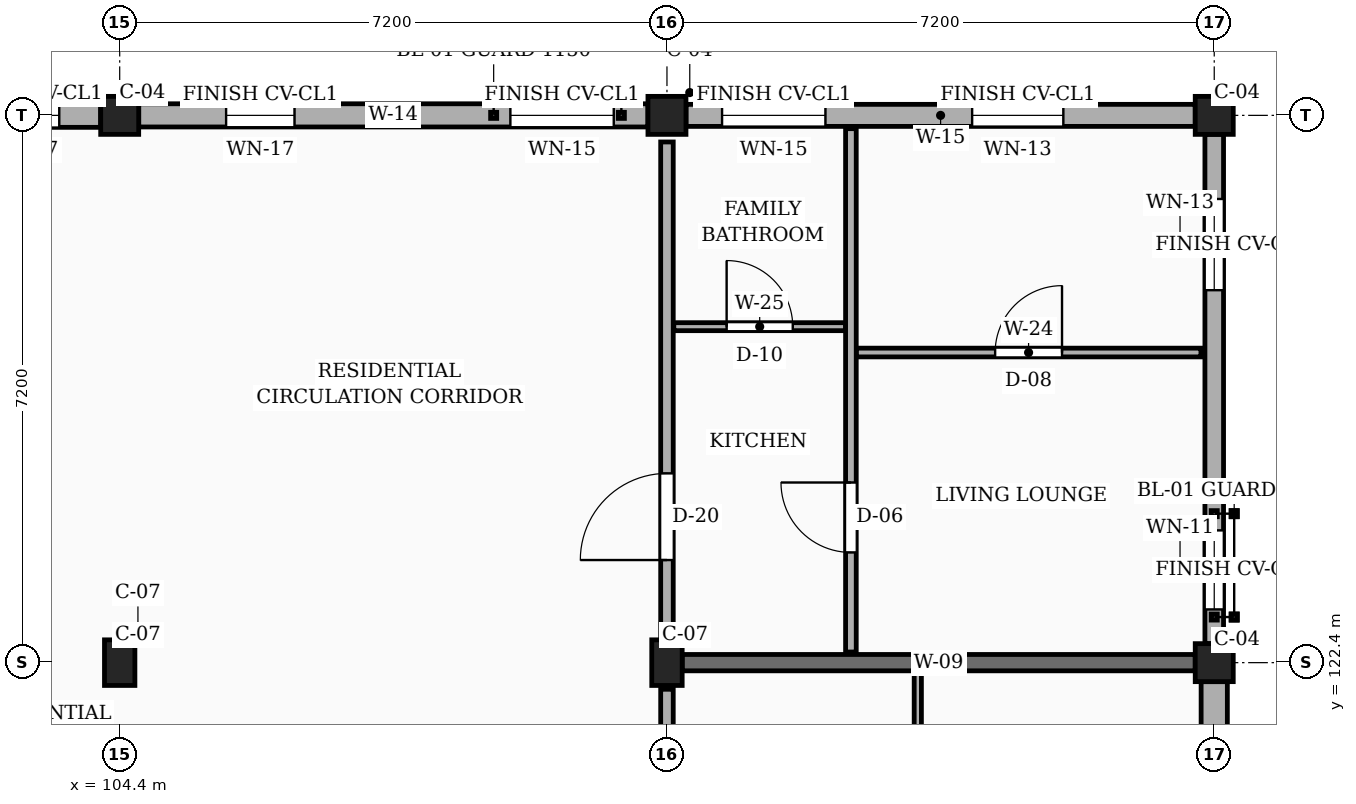
"""IFC4 building model, lengths in metres.
Left out: names, types, materials, properties, quantities, classifications, styles, units other than length and angle.
Written with IfcOpenShell. Run it as: python <this file> out.ifc"""

import sys

from ifc_helpers import new_model, si_unit, direction, frame, frame_2d, origin, origin_2d, place, context, subcontext, project, spatial, rectangle, extrude, element, fill, save


model = new_model("IFC4")
c1 = context("Model", 3, precision=1e-05, world=origin(), true_north=direction((0.0, 1.0)))
c2 = subcontext(c1, "Body", "Model", "MODEL_VIEW")
j1 = project(units=[si_unit("LENGTHUNIT", "METRE"), si_unit("PLANEANGLEUNIT", "RADIAN")], contexts=[c1])
p1 = place(None, origin())
s1 = spatial("IfcSite", under=j1, at=p1, CompositionType="ELEMENT")
p2 = place(p1, origin())
s2 = spatial("IfcBuilding", under=s1, at=p2, CompositionType="ELEMENT")
p3 = place(p2, frame((0.0, 0.0, 26.55)))
s3 = spatial("IfcBuildingStorey", under=s2, at=p3, CompositionType="ELEMENT", Elevation=26.55)
p4 = place(p3, frame((104.4, 122.4, 0.0), z_axis=(0.0, 0.0, 1.0), x_axis=(1.0, 0.0, 0.0)))
e1 = element("IfcColumn", 1, at=p4, inside=s3, PredefinedType="COLUMN", context=c2, shape_type="SweptSolid", body=[
    extrude(rectangle(XDim=0.4, YDim=0.6, at=origin_2d()), origin(), (0.0, 0.0, 1.0), 3.15),
])
p5 = place(p3, frame((104.4, 129.6, 0.0), z_axis=(0.0, 0.0, 1.0), x_axis=(1.0, 0.0, 0.0)))
e2 = element("IfcColumn", 2, at=p5, inside=s3, PredefinedType="COLUMN", context=c2, shape_type="SweptSolid", body=[
    extrude(rectangle(XDim=0.5, YDim=0.5, at=origin_2d()), origin(), (0.0, 0.0, 1.0), 3.15),
])
p6 = place(p3, frame((111.6, 122.4, 0.0), z_axis=(0.0, 0.0, 1.0), x_axis=(1.0, 0.0, 0.0)))
e3 = element("IfcColumn", 3, at=p6, inside=s3, PredefinedType="COLUMN", context=c2, shape_type="SweptSolid", body=[
    extrude(rectangle(XDim=0.4, YDim=0.6, at=origin_2d()), origin(), (0.0, 0.0, 1.0), 3.15),
])
for number, where, z_axis, x_axis in (
    (4, (111.6, 129.6, 0.0), (0.0, 0.0, 1.0), (1.0, 0.0, 0.0)),
    (5, (118.8, 122.4, 0.0), (0.0, 0.0, 1.0), (1.0, 0.0, 0.0)),
    (6, (118.8, 129.6, 0.0), (0.0, 0.0, 1.0), (1.0, 0.0, 0.0)),
):
    element("IfcColumn", number, at=place(p3, frame(where, z_axis=z_axis, x_axis=x_axis)), inside=s3, PredefinedType="COLUMN", context=c2, shape_type="SweptSolid", body=[
        extrude(rectangle(XDim=0.5, YDim=0.5, at=origin_2d()), origin(), (0.0, 0.0, 1.0), 3.15),
    ])
p7 = place(p3, frame((111.8, 122.4, 0.0), z_axis=(0.0, 0.0, 1.0), x_axis=(1.0, 0.0, 0.0)))
e7 = element("IfcWall", 7, at=p7, inside=s3, PredefinedType="SOLIDWALL", context=c2, shape_type="SweptSolid", body=[
    extrude(rectangle(XDim=6.75, YDim=0.215, at=frame_2d((3.375, 0.0))), origin(), (0.0, 0.0, 1.0), 2.19),
])
p8 = place(p3, frame((118.8, 115.45, 0.0), z_axis=(0.0, 0.0, 1.0), x_axis=(0.0, 1.0, 0.0)))
e8 = element("IfcWall", 8, at=p8, inside=s3, PredefinedType="SOLIDWALL", context=c2, shape_type="SweptSolid", body=[
    extrude(rectangle(XDim=6.7, YDim=0.345, at=frame_2d((3.35, 0.0))), origin(), (0.0, 0.0, 1.0), 2.46),
])
p9 = place(p8, frame((0.45, 0.0, 0.78)))
e9 = element("IfcOpeningElement", 9, at=p9, cuts=e8, PredefinedType="OPENING", context=c2, shape_type="SweptSolid", body=[
    extrude(rectangle(XDim=0.88, YDim=1.26, at=frame_2d((0.44, 0.63))), frame((0.0, 0.183, 0.0), z_axis=(0.0, -1.0, 0.0), x_axis=(1.0, 0.0, 0.0)), (0.0, 0.0, 1.0), 0.365),
])
p10 = place(p8, frame((4.65, 0.0, 0.78)))
e10 = element("IfcOpeningElement", 10, at=p10, cuts=e8, PredefinedType="OPENING", context=c2, shape_type="SweptSolid", body=[
    extrude(rectangle(XDim=1.04, YDim=1.26, at=frame_2d((0.52, 0.63))), frame((0.0, 0.183, 0.0), z_axis=(0.0, -1.0, 0.0), x_axis=(1.0, 0.0, 0.0)), (0.0, 0.0, 1.0), 0.365),
])
p11 = place(p3, frame((118.8, 122.65, 0.0), z_axis=(0.0, 0.0, 1.0), x_axis=(0.0, 1.0, 0.0)))
e11 = element("IfcWall", 11, at=p11, inside=s3, PredefinedType="SOLIDWALL", context=c2, shape_type="SweptSolid", body=[
    extrude(rectangle(XDim=6.7, YDim=0.245, at=frame_2d((3.35, 0.0))), origin(), (0.0, 0.0, 1.0), 2.46),
])
p12 = place(p11, frame((0.45, 0.0, 0.78)))
e12 = element("IfcOpeningElement", 12, at=p12, cuts=e11, PredefinedType="OPENING", context=c2, shape_type="SweptSolid", body=[
    extrude(rectangle(XDim=1.04, YDim=1.26, at=frame_2d((0.52, 0.63))), frame((0.0, 0.133, 0.0), z_axis=(0.0, -1.0, 0.0), x_axis=(1.0, 0.0, 0.0)), (0.0, 0.0, 1.0), 0.265),
])
p13 = place(p11, frame((4.65, 0.0, 0.78)))
e13 = element("IfcOpeningElement", 13, at=p13, cuts=e11, PredefinedType="OPENING", context=c2, shape_type="SweptSolid", body=[
    extrude(rectangle(XDim=1.2, YDim=1.26, at=frame_2d((0.6, 0.63))), frame((0.0, 0.133, 0.0), z_axis=(0.0, -1.0, 0.0), x_axis=(1.0, 0.0, 0.0)), (0.0, 0.0, 1.0), 0.265),
])
p14 = place(p3, frame((118.55, 129.6, 0.0), z_axis=(0.0, 0.0, 1.0), x_axis=(-1.0, 0.0, 0.0)))
e14 = element("IfcWall", 14, at=p14, inside=s3, PredefinedType="SOLIDWALL", context=c2, shape_type="SweptSolid", body=[
    extrude(rectangle(XDim=6.7, YDim=0.29, at=frame_2d((3.35, 0.0))), origin(), (0.0, 0.0, 1.0), 2.46),
])
p15 = place(p14, frame((1.735, 0.0, 0.78)))
e15 = element("IfcOpeningElement", 15, at=p15, cuts=e14, PredefinedType="OPENING", context=c2, shape_type="SweptSolid", body=[
    extrude(rectangle(XDim=1.2, YDim=1.26, at=frame_2d((0.6, 0.63))), frame((0.0, 0.155, 0.0), z_axis=(0.0, -1.0, 0.0), x_axis=(1.0, 0.0, 0.0)), (0.0, 0.0, 1.0), 0.31),
])
p16 = place(p14, frame((4.865, 0.0, 0.78)))
e16 = element("IfcOpeningElement", 16, at=p16, cuts=e14, PredefinedType="OPENING", context=c2, shape_type="SweptSolid", body=[
    extrude(rectangle(XDim=1.36, YDim=1.26, at=frame_2d((0.68, 0.63))), frame((0.0, 0.155, 0.0), z_axis=(0.0, -1.0, 0.0), x_axis=(1.0, 0.0, 0.0)), (0.0, 0.0, 1.0), 0.31),
])
p17 = place(p3, frame((111.35, 129.6, 0.0), z_axis=(0.0, 0.0, 1.0), x_axis=(-1.0, 0.0, 0.0)))
e17 = element("IfcWall", 17, at=p17, inside=s3, PredefinedType="SOLIDWALL", context=c2, shape_type="SweptSolid", body=[
    extrude(rectangle(XDim=6.7, YDim=0.305, at=frame_2d((3.35, 0.0))), origin(), (0.0, 0.0, 1.0), 2.46),
])
p18 = place(p17, frame((0.45, 0.0, 0.78)))
e18 = element("IfcOpeningElement", 18, at=p18, cuts=e17, PredefinedType="OPENING", context=c2, shape_type="SweptSolid", body=[
    extrude(rectangle(XDim=1.36, YDim=1.26, at=frame_2d((0.68, 0.63))), frame((0.0, 0.163, 0.0), z_axis=(0.0, -1.0, 0.0), x_axis=(1.0, 0.0, 0.0)), (0.0, 0.0, 1.0), 0.325),
])
p19 = place(p17, frame((4.65, 0.0, 0.78)))
e19 = element("IfcOpeningElement", 19, at=p19, cuts=e17, PredefinedType="OPENING", context=c2, shape_type="SweptSolid", body=[
    extrude(rectangle(XDim=0.9, YDim=1.36, at=frame_2d((0.45, 0.68))), frame((0.0, 0.163, 0.0), z_axis=(0.0, -1.0, 0.0), x_axis=(1.0, 0.0, 0.0)), (0.0, 0.0, 1.0), 0.325),
])
p20 = place(p3, frame((104.15, 129.6, 0.0), z_axis=(0.0, 0.0, 1.0), x_axis=(-1.0, 0.0, 0.0)))
e20 = element("IfcWall", 20, at=p20, inside=s3, PredefinedType="SOLIDWALL", context=c2, shape_type="SweptSolid", body=[
    extrude(rectangle(XDim=6.7, YDim=0.315, at=frame_2d((3.35, 0.0))), origin(), (0.0, 0.0, 1.0), 2.46),
])
p21 = place(p20, frame((0.545, 0.0, 0.78)))
e21 = element("IfcOpeningElement", 21, at=p21, cuts=e20, PredefinedType="OPENING", context=c2, shape_type="SweptSolid", body=[
    extrude(rectangle(XDim=0.9, YDim=1.36, at=frame_2d((0.45, 0.68))), frame((0.0, 0.167, 0.0), z_axis=(0.0, -1.0, 0.0), x_axis=(1.0, 0.0, 0.0)), (0.0, 0.0, 1.0), 0.335),
])
p22 = place(p20, frame((2.33, 0.0, 0.78)))
e22 = element("IfcOpeningElement", 22, at=p22, cuts=e20, PredefinedType="OPENING", context=c2, shape_type="SweptSolid", body=[
    extrude(rectangle(XDim=1.06, YDim=1.36, at=frame_2d((0.53, 0.68))), frame((0.0, 0.167, 0.0), z_axis=(0.0, -1.0, 0.0), x_axis=(1.0, 0.0, 0.0)), (0.0, 0.0, 1.0), 0.335),
])
p23 = place(p20, frame((4.605, 0.0, 0.78)))
e23 = element("IfcOpeningElement", 23, at=p23, cuts=e20, PredefinedType="OPENING", context=c2, shape_type="SweptSolid", body=[
    extrude(rectangle(XDim=1.22, YDim=1.36, at=frame_2d((0.61, 0.68))), frame((0.0, 0.167, 0.0), z_axis=(0.0, -1.0, 0.0), x_axis=(1.0, 0.0, 0.0)), (0.0, 0.0, 1.0), 0.335),
])
p24 = place(p3, frame((111.6, 115.55, 0.0), z_axis=(0.0, 0.0, 1.0), x_axis=(0.0, 1.0, 0.0)))
e24 = element("IfcWall", 24, at=p24, inside=s3, PredefinedType="PARTITIONING", context=c2, shape_type="SweptSolid", body=[
    extrude(rectangle(XDim=6.5, YDim=0.165, at=frame_2d((3.25, 0.0))), origin(), (0.0, 0.0, 1.0), 2.325),
])
p25 = place(p24, frame((1.1, 0.0, 0.0)))
e25 = element("IfcOpeningElement", 25, at=p25, cuts=e24, PredefinedType="OPENING", context=c2, shape_type="SweptSolid", body=[
    extrude(rectangle(XDim=0.94, YDim=2.12, at=frame_2d((0.47, 1.06))), frame((0.0, 0.093, 0.0), z_axis=(0.0, -1.0, 0.0), x_axis=(1.0, 0.0, 0.0)), (0.0, 0.0, 1.0), 0.185),
])
p26 = place(p3, frame((111.6, 122.75, 0.0), z_axis=(0.0, 0.0, 1.0), x_axis=(0.0, 1.0, 0.0)))
e26 = element("IfcWall", 26, at=p26, inside=s3, PredefinedType="PARTITIONING", context=c2, shape_type="SweptSolid", body=[
    extrude(rectangle(XDim=6.5, YDim=0.165, at=frame_2d((3.25, 0.0))), origin(), (0.0, 0.0, 1.0), 2.325),
])
p27 = place(p26, frame((1.0, 0.0, 0.0)))
e27 = element("IfcOpeningElement", 27, at=p27, cuts=e26, PredefinedType="OPENING", context=c2, shape_type="SweptSolid", body=[
    extrude(rectangle(XDim=1.14, YDim=2.18, at=frame_2d((0.57, 1.09))), frame((0.0, 0.093, 0.0), z_axis=(0.0, -1.0, 0.0), x_axis=(1.0, 0.0, 0.0)), (0.0, 0.0, 1.0), 0.185),
])
p28 = place(p3, frame((114.9, 119.07, 0.0), z_axis=(0.0, 0.0, 1.0), x_axis=(0.0, 1.0, 0.0)))
e28 = element("IfcWall", 28, at=p28, inside=s3, PredefinedType="PARTITIONING", context=c2, shape_type="SweptSolid", body=[
    extrude(rectangle(XDim=3.19, YDim=0.095, at=frame_2d((1.595, 0.0))), origin(), (0.0, 0.0, 1.0), 2.325),
])
p29 = place(p3, frame((114.09, 126.48, 0.0), z_axis=(0.0, 0.0, 1.0), x_axis=(1.0, 0.0, 0.0)))
e29 = element("IfcWall", 29, at=p29, inside=s3, PredefinedType="PARTITIONING", context=c2, shape_type="SweptSolid", body=[
    extrude(rectangle(XDim=4.535, YDim=0.115, at=frame_2d((2.268, 0.0))), origin(), (0.0, 0.0, 1.0), 2.325),
])
p30 = place(p29, frame((1.827, 0.0, 0.0)))
e30 = element("IfcOpeningElement", 30, at=p30, cuts=e29, PredefinedType="OPENING", context=c2, shape_type="SweptSolid", body=[
    extrude(rectangle(XDim=0.88, YDim=2.08, at=frame_2d((0.44, 1.04))), frame((0.0, 0.067, 0.0), z_axis=(0.0, -1.0, 0.0), x_axis=(1.0, 0.0, 0.0)), (0.0, 0.0, 1.0), 0.135),
])
p31 = place(p3, frame((111.69, 126.82, 0.0), z_axis=(0.0, 0.0, 1.0), x_axis=(1.0, 0.0, 0.0)))
e31 = element("IfcWall", 31, at=p31, inside=s3, PredefinedType="PARTITIONING", context=c2, shape_type="SweptSolid", body=[
    extrude(rectangle(XDim=2.26, YDim=0.105, at=frame_2d((1.13, 0.0))), origin(), (0.0, 0.0, 1.0), 2.325),
])
p32 = place(p31, frame((0.695, 0.0, 0.0)))
e32 = element("IfcOpeningElement", 32, at=p32, cuts=e31, PredefinedType="OPENING", context=c2, shape_type="SweptSolid", body=[
    extrude(rectangle(XDim=0.87, YDim=2.05, at=frame_2d((0.435, 1.025))), frame((0.0, 0.062, 0.0), z_axis=(0.0, -1.0, 0.0), x_axis=(1.0, 0.0, 0.0)), (0.0, 0.0, 1.0), 0.125),
])
p33 = place(p3, frame((114.02, 122.54, 0.0), z_axis=(0.0, 0.0, 1.0), x_axis=(0.0, 1.0, 0.0)))
e33 = element("IfcWall", 33, at=p33, inside=s3, PredefinedType="PARTITIONING", context=c2, shape_type="SweptSolid", body=[
    extrude(rectangle(XDim=6.885, YDim=0.14, at=frame_2d((3.442, 0.0))), origin(), (0.0, 0.0, 1.0), 2.325),
])
p34 = place(p33, frame((1.31, 0.0, 0.0)))
e34 = element("IfcOpeningElement", 34, at=p34, cuts=e33, PredefinedType="OPENING", context=c2, shape_type="SweptSolid", body=[
    extrude(rectangle(XDim=0.92, YDim=2.1, at=frame_2d((0.46, 1.05))), frame((0.0, 0.08, 0.0), z_axis=(0.0, -1.0, 0.0), x_axis=(1.0, 0.0, 0.0)), (0.0, 0.0, 1.0), 0.16),
])
p35 = place(p12, origin())
e35 = element("IfcWindow", 35, at=p35, inside=s3, PartitioningType="SINGLE_PANEL", PredefinedType="WINDOW", context=c2, shape_type="SweptSolid", body=[
    extrude(rectangle(XDim=1.04, YDim=1.26, at=frame_2d((0.52, 0.63))), frame((0.0, 0.03, 0.0), z_axis=(0.0, -1.0, 0.0), x_axis=(1.0, 0.0, 0.0)), (0.0, 0.0, 1.0), 0.06),
])
fill(e12, e35)
p36 = place(p13, origin())
e36 = element("IfcWindow", 36, at=p36, inside=s3, PartitioningType="SINGLE_PANEL", PredefinedType="WINDOW", context=c2, shape_type="SweptSolid", body=[
    extrude(rectangle(XDim=1.2, YDim=1.26, at=frame_2d((0.6, 0.63))), frame((0.0, 0.03, 0.0), z_axis=(0.0, -1.0, 0.0), x_axis=(1.0, 0.0, 0.0)), (0.0, 0.0, 1.0), 0.06),
])
fill(e13, e36)
p37 = place(p15, origin())
e37 = element("IfcWindow", 37, at=p37, inside=s3, PartitioningType="SINGLE_PANEL", PredefinedType="WINDOW", context=c2, shape_type="SweptSolid", body=[
    extrude(rectangle(XDim=1.2, YDim=1.26, at=frame_2d((0.6, 0.63))), frame((0.0, 0.03, 0.0), z_axis=(0.0, -1.0, 0.0), x_axis=(1.0, 0.0, 0.0)), (0.0, 0.0, 1.0), 0.06),
])
fill(e15, e37)
p38 = place(p16, origin())
e38 = element("IfcWindow", 38, at=p38, inside=s3, PartitioningType="SINGLE_PANEL", PredefinedType="WINDOW", context=c2, shape_type="SweptSolid", body=[
    extrude(rectangle(XDim=1.36, YDim=1.26, at=frame_2d((0.68, 0.63))), frame((0.0, 0.03, 0.0), z_axis=(0.0, -1.0, 0.0), x_axis=(1.0, 0.0, 0.0)), (0.0, 0.0, 1.0), 0.06),
])
fill(e16, e38)
p39 = place(p18, origin())
e39 = element("IfcWindow", 39, at=p39, inside=s3, PartitioningType="SINGLE_PANEL", PredefinedType="WINDOW", context=c2, shape_type="SweptSolid", body=[
    extrude(rectangle(XDim=1.36, YDim=1.26, at=frame_2d((0.68, 0.63))), frame((0.0, 0.03, 0.0), z_axis=(0.0, -1.0, 0.0), x_axis=(1.0, 0.0, 0.0)), (0.0, 0.0, 1.0), 0.06),
])
fill(e18, e39)
p40 = place(p19, origin())
e40 = element("IfcWindow", 40, at=p40, inside=s3, PartitioningType="SINGLE_PANEL", PredefinedType="WINDOW", context=c2, shape_type="SweptSolid", body=[
    extrude(rectangle(XDim=0.9, YDim=1.36, at=frame_2d((0.45, 0.68))), frame((0.0, 0.03, 0.0), z_axis=(0.0, -1.0, 0.0), x_axis=(1.0, 0.0, 0.0)), (0.0, 0.0, 1.0), 0.06),
])
fill(e19, e40)
p41 = place(p21, origin())
e41 = element("IfcWindow", 41, at=p41, inside=s3, PartitioningType="SINGLE_PANEL", PredefinedType="WINDOW", context=c2, shape_type="SweptSolid", body=[
    extrude(rectangle(XDim=0.9, YDim=1.36, at=frame_2d((0.45, 0.68))), frame((0.0, 0.03, 0.0), z_axis=(0.0, -1.0, 0.0), x_axis=(1.0, 0.0, 0.0)), (0.0, 0.0, 1.0), 0.06),
])
fill(e21, e41)
p42 = place(p27, origin())
e42 = element("IfcDoor", 42, at=p42, inside=s3, OperationType="SINGLE_SWING_LEFT", PredefinedType="DOOR", context=c2, shape_type="SweptSolid", body=[
    extrude(rectangle(XDim=1.14, YDim=2.18, at=frame_2d((0.57, 1.09))), frame((0.0, 0.025, 0.0), z_axis=(0.0, -1.0, 0.0), x_axis=(1.0, 0.0, 0.0)), (0.0, 0.0, 1.0), 0.05),
])
fill(e27, e42)
p43 = place(p30, origin())
e43 = element("IfcDoor", 43, at=p43, inside=s3, OperationType="SINGLE_SWING_RIGHT", PredefinedType="DOOR", context=c2, shape_type="SweptSolid", body=[
    extrude(rectangle(XDim=0.88, YDim=2.08, at=frame_2d((0.44, 1.04))), frame((0.0, 0.025, 0.0), z_axis=(0.0, -1.0, 0.0), x_axis=(1.0, 0.0, 0.0)), (0.0, 0.0, 1.0), 0.05),
])
fill(e30, e43)
p44 = place(p32, origin())
e44 = element("IfcDoor", 44, at=p44, inside=s3, OperationType="SINGLE_SWING_LEFT", PredefinedType="DOOR", context=c2, shape_type="SweptSolid", body=[
    extrude(rectangle(XDim=0.87, YDim=2.05, at=frame_2d((0.435, 1.025))), frame((0.0, 0.025, 0.0), z_axis=(0.0, -1.0, 0.0), x_axis=(1.0, 0.0, 0.0)), (0.0, 0.0, 1.0), 0.05),
])
fill(e32, e44)
p45 = place(p34, origin())
e45 = element("IfcDoor", 45, at=p45, inside=s3, OperationType="SINGLE_SWING_RIGHT", PredefinedType="DOOR", context=c2, shape_type="SweptSolid", body=[
    extrude(rectangle(XDim=0.92, YDim=2.1, at=frame_2d((0.46, 1.05))), frame((0.0, 0.025, 0.0), z_axis=(0.0, -1.0, 0.0), x_axis=(1.0, 0.0, 0.0)), (0.0, 0.0, 1.0), 0.05),
])
fill(e34, e45)
save(model, sys.argv[1])
